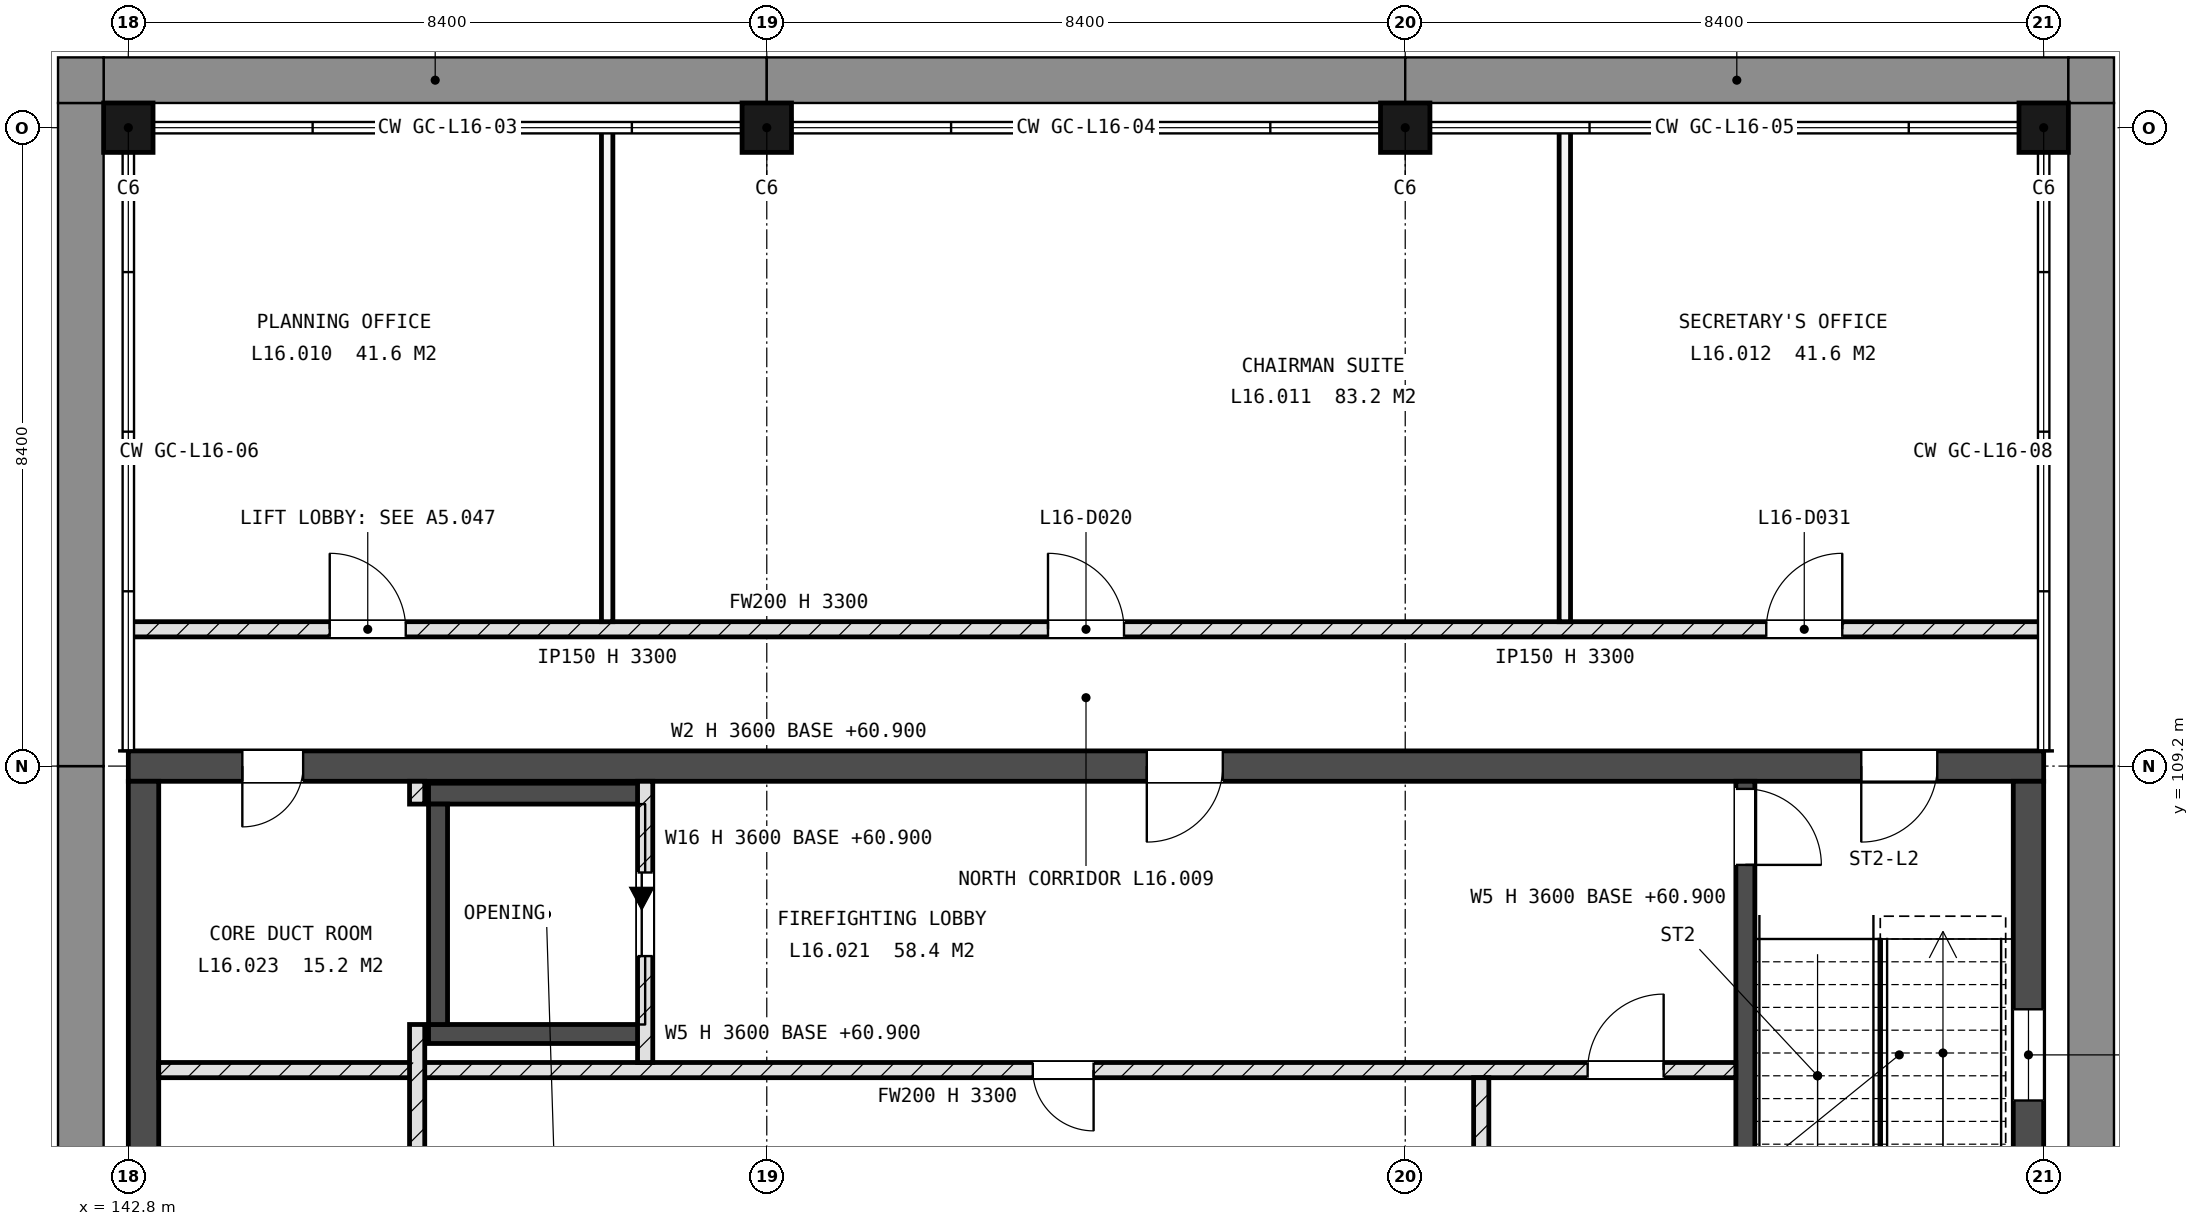
"""IFC4 building model, lengths in metres.
Left out: names, types, materials, properties, quantities, classifications, styles, units other than length and angle.
Written with IfcOpenShell. Run it as: python <this file> out.ifc"""

import sys

from ifc_helpers import new_model, si_unit, direction, frame, frame_2d, origin, origin_2d, place, context, subcontext, project, spatial, rectangle, extrude, element, fill, save


model = new_model("IFC4")
c1 = context("Model", 3, precision=1e-05, world=origin(), true_north=direction((0.0, 1.0)))
c2 = subcontext(c1, "Body", "Model", "MODEL_VIEW")
j1 = project(units=[si_unit("LENGTHUNIT", "METRE"), si_unit("PLANEANGLEUNIT", "RADIAN")], contexts=[c1])
p1 = place(None, origin())
s1 = spatial("IfcSite", under=j1, at=p1, CompositionType="ELEMENT")
p2 = place(p1, origin())
s2 = spatial("IfcBuilding", under=s1, at=p2, CompositionType="ELEMENT")
p3 = place(p2, frame((0.0, 0.0, 61.2)))
s3 = spatial("IfcBuildingStorey", under=s2, at=p3, CompositionType="ELEMENT", Elevation=61.2)
for number, where, z_axis, x_axis in (
    (1, (142.8, 117.6, -0.3), (0.0, 0.0, 1.0), (1.0, 0.0, 0.0)),
    (2, (151.2, 117.6, -0.3), (0.0, 0.0, 1.0), (1.0, 0.0, 0.0)),
    (3, (159.6, 117.6, -0.3), (0.0, 0.0, 1.0), (1.0, 0.0, 0.0)),
    (4, (168.0, 117.6, -0.3), (0.0, 0.0, 1.0), (1.0, 0.0, 0.0)),
):
    element("IfcColumn", number, at=place(p3, frame(where, z_axis=z_axis, x_axis=x_axis)), inside=s3, PredefinedType="COLUMN", context=c2, shape_type="SweptSolid", body=[
        extrude(rectangle(XDim=0.65, YDim=0.65, at=origin_2d()), origin(), (0.0, 0.0, 1.0), 3.6),
    ])
p4 = place(p3, frame((142.8, 109.2, -0.3), z_axis=(0.0, 0.0, 1.0), x_axis=(1.0, 0.0, 0.0)))
e5 = element("IfcWall", 5, at=p4, inside=s3, PredefinedType="SHEAR", context=c2, shape_type="SweptSolid", body=[
    extrude(rectangle(XDim=25.2, YDim=0.4, at=frame_2d((12.6, 0.0))), origin(), (0.0, 0.0, 1.0), 3.6),
])
p5 = place(p4, frame((22.8, 0.0, 0.3)))
e6 = element("IfcOpeningElement", 6, at=p5, cuts=e5, PredefinedType="OPENING", context=c2, shape_type="SweptSolid", body=[
    extrude(rectangle(XDim=1.0, YDim=2.1, at=frame_2d((0.5, 1.05))), frame((0.0, 0.21, 0.0), z_axis=(0.0, -1.0, 0.0), x_axis=(1.0, 0.0, 0.0)), (0.0, 0.0, 1.0), 0.42),
])
p6 = place(p4, frame((1.5, 0.0, 0.3)))
e7 = element("IfcOpeningElement", 7, at=p6, cuts=e5, PredefinedType="OPENING", context=c2, shape_type="SweptSolid", body=[
    extrude(rectangle(XDim=0.8, YDim=2.1, at=frame_2d((0.4, 1.05))), frame((0.0, 0.21, 0.0), z_axis=(0.0, -1.0, 0.0), x_axis=(1.0, 0.0, 0.0)), (0.0, 0.0, 1.0), 0.42),
])
p7 = place(p4, frame((13.4, 0.0, 0.3)))
e8 = element("IfcOpeningElement", 8, at=p7, cuts=e5, PredefinedType="OPENING", context=c2, shape_type="SweptSolid", body=[
    extrude(rectangle(XDim=1.0, YDim=2.1, at=frame_2d((0.5, 1.05))), frame((0.0, 0.21, 0.0), z_axis=(0.0, -1.0, 0.0), x_axis=(1.0, 0.0, 0.0)), (0.0, 0.0, 1.0), 0.42),
])
p8 = place(p3, frame((143.0, 92.6, -0.3), z_axis=(0.0, 0.0, 1.0), x_axis=(0.0, 1.0, 0.0)))
e9 = element("IfcWall", 9, at=p8, inside=s3, PredefinedType="SHEAR", context=c2, shape_type="SweptSolid", body=[
    extrude(rectangle(XDim=16.4, YDim=0.4, at=frame_2d((8.2, 0.0))), origin(), (0.0, 0.0, 1.0), 3.6),
])
p9 = place(p8, frame((3.0, 0.0, 1.9)))
e10 = element("IfcOpeningElement", 10, at=p9, cuts=e9, PredefinedType="OPENING", context=c2, shape_type="SweptSolid", body=[
    extrude(rectangle(XDim=1.2, YDim=0.9, at=frame_2d((0.6, 0.45))), frame((0.0, 0.21, 0.0), z_axis=(0.0, -1.0, 0.0), x_axis=(1.0, 0.0, 0.0)), (0.0, 0.0, 1.0), 0.42),
])
p10 = place(p3, frame((167.8, 92.6, -0.3), z_axis=(0.0, 0.0, 1.0), x_axis=(0.0, 1.0, 0.0)))
e11 = element("IfcWall", 11, at=p10, inside=s3, PredefinedType="SHEAR", context=c2, shape_type="SweptSolid", body=[
    extrude(rectangle(XDim=16.4, YDim=0.4, at=frame_2d((8.2, 0.0))), origin(), (0.0, 0.0, 1.0), 3.6),
])
p11 = place(p10, frame((12.2, 0.0, 1.9)))
e12 = element("IfcOpeningElement", 12, at=p11, cuts=e11, PredefinedType="OPENING", context=c2, shape_type="SweptSolid", body=[
    extrude(rectangle(XDim=1.2, YDim=0.9, at=frame_2d((0.6, 0.45))), frame((0.0, 0.21, 0.0), z_axis=(0.0, -1.0, 0.0), x_axis=(1.0, 0.0, 0.0)), (0.0, 0.0, 1.0), 0.42),
])
p12 = place(p3, frame((164.075, 101.35, -0.3), z_axis=(0.0, 0.0, 1.0), x_axis=(0.0, 1.0, 0.0)))
e13 = element("IfcWall", 13, at=p12, inside=s3, PredefinedType="SHEAR", context=c2, shape_type="SweptSolid", body=[
    extrude(rectangle(XDim=7.65, YDim=0.25, at=frame_2d((3.825, 0.0))), origin(), (0.0, 0.0, 1.0), 3.6),
])
p13 = place(p12, frame((6.55, 0.0, 0.3)))
e14 = element("IfcOpeningElement", 14, at=p13, cuts=e13, PredefinedType="OPENING", context=c2, shape_type="SweptSolid", body=[
    extrude(rectangle(XDim=1.0, YDim=2.1, at=frame_2d((0.5, 1.05))), frame((0.0, 0.135, 0.0), z_axis=(0.0, -1.0, 0.0), x_axis=(1.0, 0.0, 0.0)), (0.0, 0.0, 1.0), 0.27),
])
p14 = place(p3, frame((146.75, 105.675, -0.3), z_axis=(0.0, 0.0, 1.0), x_axis=(1.0, 0.0, 0.0)))
e15 = element("IfcWall", 15, at=p14, inside=s3, PredefinedType="SHEAR", context=c2, shape_type="SweptSolid", body=[
    extrude(rectangle(XDim=2.85, YDim=0.25, at=frame_2d((1.425, 0.0))), origin(), (0.0, 0.0, 1.0), 3.6),
])
p15 = place(p3, frame((146.75, 108.837, -0.3), z_axis=(0.0, 0.0, 1.0), x_axis=(1.0, 0.0, 0.0)))
e16 = element("IfcWall", 16, at=p15, inside=s3, PredefinedType="SHEAR", context=c2, shape_type="SweptSolid", body=[
    extrude(rectangle(XDim=2.85, YDim=0.275, at=frame_2d((1.425, 0.0))), origin(), (0.0, 0.0, 1.0), 3.6),
])
p16 = place(p3, frame((146.875, 105.8, -0.3), z_axis=(0.0, 0.0, 1.0), x_axis=(0.0, 1.0, 0.0)))
e17 = element("IfcWall", 17, at=p16, inside=s3, PredefinedType="SHEAR", context=c2, shape_type="SweptSolid", body=[
    extrude(rectangle(XDim=2.9, YDim=0.25, at=frame_2d((1.45, 0.0))), origin(), (0.0, 0.0, 1.0), 3.6),
])
p17 = place(p3, frame((143.2, 105.2, 0.0), z_axis=(0.0, 0.0, 1.0), x_axis=(1.0, 0.0, 0.0)))
e18 = element("IfcWall", 18, at=p17, inside=s3, PredefinedType="SOLIDWALL", context=c2, shape_type="SweptSolid", body=[
    extrude(rectangle(XDim=20.75, YDim=0.2, at=frame_2d((10.375, 0.0))), origin(), (0.0, 0.0, 1.0), 3.3),
])
p18 = place(p17, frame((11.5, 0.0, 0.0)))
e19 = element("IfcOpeningElement", 19, at=p18, cuts=e18, PredefinedType="OPENING", context=c2, shape_type="SweptSolid", body=[
    extrude(rectangle(XDim=0.8, YDim=2.1, at=frame_2d((0.4, 1.05))), frame((0.0, 0.11, 0.0), z_axis=(0.0, -1.0, 0.0), x_axis=(1.0, 0.0, 0.0)), (0.0, 0.0, 1.0), 0.22),
])
p19 = place(p17, frame((18.8, 0.0, 0.0)))
e20 = element("IfcOpeningElement", 20, at=p19, cuts=e18, PredefinedType="OPENING", context=c2, shape_type="SweptSolid", body=[
    extrude(rectangle(XDim=1.0, YDim=2.1, at=frame_2d((0.5, 1.05))), frame((0.0, 0.11, 0.0), z_axis=(0.0, -1.0, 0.0), x_axis=(1.0, 0.0, 0.0)), (0.0, 0.0, 1.0), 0.22),
])
p20 = place(p3, frame((142.8, 111.0, 0.0), z_axis=(0.0, 0.0, 1.0), x_axis=(1.0, 0.0, 0.0)))
e21 = element("IfcWall", 21, at=p20, inside=s3, PredefinedType="SOLIDWALL", context=c2, shape_type="SweptSolid", body=[
    extrude(rectangle(XDim=25.2, YDim=0.2, at=frame_2d((12.6, 0.0))), origin(), (0.0, 0.0, 1.0), 3.3),
])
p21 = place(p20, frame((2.65, 0.0, 0.0)))
e22 = element("IfcOpeningElement", 22, at=p21, cuts=e21, PredefinedType="OPENING", context=c2, shape_type="SweptSolid", body=[
    extrude(rectangle(XDim=1.0, YDim=2.1, at=frame_2d((0.5, 1.05))), frame((0.0, 0.11, 0.0), z_axis=(0.0, -1.0, 0.0), x_axis=(1.0, 0.0, 0.0)), (0.0, 0.0, 1.0), 0.22),
])
p22 = place(p20, frame((12.1, 0.0, 0.0)))
e23 = element("IfcOpeningElement", 23, at=p22, cuts=e21, PredefinedType="OPENING", context=c2, shape_type="SweptSolid", body=[
    extrude(rectangle(XDim=1.0, YDim=2.1, at=frame_2d((0.5, 1.05))), frame((0.0, 0.11, 0.0), z_axis=(0.0, -1.0, 0.0), x_axis=(1.0, 0.0, 0.0)), (0.0, 0.0, 1.0), 0.22),
])
p23 = place(p20, frame((21.55, 0.0, 0.0)))
e24 = element("IfcOpeningElement", 24, at=p23, cuts=e21, PredefinedType="OPENING", context=c2, shape_type="SweptSolid", body=[
    extrude(rectangle(XDim=1.0, YDim=2.1, at=frame_2d((0.5, 1.05))), frame((0.0, 0.11, 0.0), z_axis=(0.0, -1.0, 0.0), x_axis=(1.0, 0.0, 0.0)), (0.0, 0.0, 1.0), 0.22),
])
p24 = place(p3, frame((146.6, 100.5, 0.0), z_axis=(0.0, 0.0, 1.0), x_axis=(0.0, 1.0, 0.0)))
e25 = element("IfcWall", 25, at=p24, inside=s3, PredefinedType="SOLIDWALL", context=c2, shape_type="SweptSolid", body=[
    extrude(rectangle(XDim=5.3, YDim=0.2, at=frame_2d((2.65, 0.0))), origin(), (0.0, 0.0, 1.0), 3.3),
])
p25 = place(p24, frame((1.8, 0.0, 0.0)))
e26 = element("IfcOpeningElement", 26, at=p25, cuts=e25, PredefinedType="OPENING", context=c2, shape_type="SweptSolid", body=[
    extrude(rectangle(XDim=1.0, YDim=2.1, at=frame_2d((0.5, 1.05))), frame((0.0, 0.11, 0.0), z_axis=(0.0, -1.0, 0.0), x_axis=(1.0, 0.0, 0.0)), (0.0, 0.0, 1.0), 0.22),
])
p26 = place(p3, frame((146.6, 108.7, 0.0), z_axis=(0.0, 0.0, 1.0), x_axis=(0.0, 1.0, 0.0)))
e27 = element("IfcWall", 27, at=p26, inside=s3, PredefinedType="SOLIDWALL", context=c2, shape_type="SweptSolid", body=[
    extrude(rectangle(XDim=0.3, YDim=0.2, at=frame_2d((0.15, 0.0))), origin(), (0.0, 0.0, 1.0), 3.3),
])
p27 = place(p3, frame((149.1, 111.1, 0.0), z_axis=(0.0, 0.0, 1.0), x_axis=(0.0, 1.0, 0.0)))
e28 = element("IfcWall", 28, at=p27, inside=s3, PredefinedType="PARTITIONING", context=c2, shape_type="SweptSolid", body=[
    extrude(rectangle(XDim=6.5, YDim=0.15, at=frame_2d((3.25, 0.0))), origin(), (0.0, 0.0, 1.0), 3.3),
])
p28 = place(p3, frame((149.6, 105.3, 0.0), z_axis=(0.0, 0.0, 1.0), x_axis=(0.0, 1.0, 0.0)))
e29 = element("IfcWall", 29, at=p28, inside=s3, PredefinedType="SOLIDWALL", context=c2, shape_type="SweptSolid", body=[
    extrude(rectangle(XDim=3.7, YDim=0.2, at=frame_2d((1.85, 0.0))), origin(), (0.0, 0.0, 1.0), 3.3),
])
p29 = place(p28, frame((1.4, 0.0, 0.0)))
e30 = element("IfcOpeningElement", 30, at=p29, cuts=e29, PredefinedType="OPENING", context=c2, shape_type="SweptSolid", body=[
    extrude(rectangle(XDim=1.1, YDim=2.1, at=frame_2d((0.55, 1.05))), frame((0.0, 0.11, 0.0), z_axis=(0.0, -1.0, 0.0), x_axis=(1.0, 0.0, 0.0)), (0.0, 0.0, 1.0), 0.22),
])
p30 = place(p3, frame((160.6, 92.6, 0.0), z_axis=(0.0, 0.0, 1.0), x_axis=(0.0, 1.0, 0.0)))
e31 = element("IfcWall", 31, at=p30, inside=s3, PredefinedType="SOLIDWALL", context=c2, shape_type="SweptSolid", body=[
    extrude(rectangle(XDim=12.5, YDim=0.2, at=frame_2d((6.25, 0.0))), origin(), (0.0, 0.0, 1.0), 3.3),
])
p31 = place(p30, frame((5.1, 0.0, 0.0)))
e32 = element("IfcOpeningElement", 32, at=p31, cuts=e31, PredefinedType="OPENING", context=c2, shape_type="SweptSolid", body=[
    extrude(rectangle(XDim=0.8, YDim=2.1, at=frame_2d((0.4, 1.05))), frame((0.0, 0.11, 0.0), z_axis=(0.0, -1.0, 0.0), x_axis=(1.0, 0.0, 0.0)), (0.0, 0.0, 1.0), 0.22),
])
p32 = place(p30, frame((0.8, 0.0, 0.0)))
e33 = element("IfcOpeningElement", 33, at=p32, cuts=e31, PredefinedType="OPENING", context=c2, shape_type="SweptSolid", body=[
    extrude(rectangle(XDim=1.0, YDim=2.1, at=frame_2d((0.5, 1.05))), frame((0.0, 0.11, 0.0), z_axis=(0.0, -1.0, 0.0), x_axis=(1.0, 0.0, 0.0)), (0.0, 0.0, 1.0), 0.22),
])
p33 = place(p3, frame((161.7, 111.1, 0.0), z_axis=(0.0, 0.0, 1.0), x_axis=(0.0, 1.0, 0.0)))
e34 = element("IfcWall", 34, at=p33, inside=s3, PredefinedType="PARTITIONING", context=c2, shape_type="SweptSolid", body=[
    extrude(rectangle(XDim=6.5, YDim=0.15, at=frame_2d((3.25, 0.0))), origin(), (0.0, 0.0, 1.0), 3.3),
])
p34 = place(p11, origin())
e35 = element("IfcWindow", 35, at=p34, inside=s3, PartitioningType="SINGLE_PANEL", PredefinedType="WINDOW", context=c2, shape_type="SweptSolid", body=[
    extrude(rectangle(XDim=1.2, YDim=0.9, at=frame_2d((0.6, 0.45))), frame((0.0, 0.03, 0.0), z_axis=(0.0, -1.0, 0.0), x_axis=(1.0, 0.0, 0.0)), (0.0, 0.0, 1.0), 0.06),
])
fill(e12, e35)
p35 = place(p29, origin())
e36 = element("IfcDoor", 36, at=p35, inside=s3, OperationType="SLIDING_TO_LEFT", PredefinedType="DOOR", context=c2, shape_type="SweptSolid", body=[
    extrude(rectangle(XDim=1.1, YDim=2.1, at=frame_2d((0.55, 1.05))), frame((0.0, 0.025, 0.0), z_axis=(0.0, -1.0, 0.0), x_axis=(1.0, 0.0, 0.0)), (0.0, 0.0, 1.0), 0.05),
])
fill(e30, e36)
p36 = place(p13, origin())
e37 = element("IfcDoor", 37, at=p36, inside=s3, OperationType="SINGLE_SWING_LEFT", PredefinedType="DOOR", context=c2, shape_type="SweptSolid", body=[
    extrude(rectangle(XDim=1.0, YDim=2.1, at=frame_2d((0.5, 1.05))), frame((0.0, 0.025, 0.0), z_axis=(0.0, -1.0, 0.0), x_axis=(1.0, 0.0, 0.0)), (0.0, 0.0, 1.0), 0.05),
])
fill(e14, e37)
p37 = place(p5, origin())
e38 = element("IfcDoor", 38, at=p37, inside=s3, OperationType="SINGLE_SWING_LEFT", PredefinedType="DOOR", context=c2, shape_type="SweptSolid", body=[
    extrude(rectangle(XDim=1.0, YDim=2.1, at=frame_2d((0.5, 1.05))), frame((0.0, 0.025, 0.0), z_axis=(0.0, -1.0, 0.0), x_axis=(1.0, 0.0, 0.0)), (0.0, 0.0, 1.0), 0.05),
])
fill(e6, e38)
p38 = place(p21, origin())
e39 = element("IfcDoor", 39, at=p38, inside=s3, OperationType="SINGLE_SWING_RIGHT", PredefinedType="DOOR", context=c2, shape_type="SweptSolid", body=[
    extrude(rectangle(XDim=1.0, YDim=2.1, at=frame_2d((0.5, 1.05))), frame((0.0, 0.025, 0.0), z_axis=(0.0, -1.0, 0.0), x_axis=(1.0, 0.0, 0.0)), (0.0, 0.0, 1.0), 0.05),
])
fill(e22, e39)
p39 = place(p22, origin())
e40 = element("IfcDoor", 40, at=p39, inside=s3, OperationType="SINGLE_SWING_RIGHT", PredefinedType="DOOR", context=c2, shape_type="SweptSolid", body=[
    extrude(rectangle(XDim=1.0, YDim=2.1, at=frame_2d((0.5, 1.05))), frame((0.0, 0.025, 0.0), z_axis=(0.0, -1.0, 0.0), x_axis=(1.0, 0.0, 0.0)), (0.0, 0.0, 1.0), 0.05),
])
fill(e23, e40)
p40 = place(p23, origin())
e41 = element("IfcDoor", 41, at=p40, inside=s3, OperationType="SINGLE_SWING_LEFT", PredefinedType="DOOR", context=c2, shape_type="SweptSolid", body=[
    extrude(rectangle(XDim=1.0, YDim=2.1, at=frame_2d((0.5, 1.05))), frame((0.0, 0.025, 0.0), z_axis=(0.0, -1.0, 0.0), x_axis=(1.0, 0.0, 0.0)), (0.0, 0.0, 1.0), 0.05),
])
fill(e24, e41)
p41 = place(p18, origin())
e42 = element("IfcDoor", 42, at=p41, inside=s3, OperationType="SINGLE_SWING_RIGHT", PredefinedType="DOOR", context=c2, shape_type="SweptSolid", body=[
    extrude(rectangle(XDim=0.8, YDim=2.1, at=frame_2d((0.4, 1.05))), frame((0.0, 0.025, 0.0), z_axis=(0.0, -1.0, 0.0), x_axis=(1.0, 0.0, 0.0)), (0.0, 0.0, 1.0), 0.05),
])
fill(e19, e42)
p42 = place(p6, origin())
e43 = element("IfcDoor", 43, at=p42, inside=s3, OperationType="SINGLE_SWING_LEFT", PredefinedType="DOOR", context=c2, shape_type="SweptSolid", body=[
    extrude(rectangle(XDim=0.8, YDim=2.1, at=frame_2d((0.4, 1.05))), frame((0.0, 0.025, 0.0), z_axis=(0.0, -1.0, 0.0), x_axis=(1.0, 0.0, 0.0)), (0.0, 0.0, 1.0), 0.05),
])
fill(e7, e43)
p43 = place(p7, origin())
e44 = element("IfcDoor", 44, at=p43, inside=s3, OperationType="SINGLE_SWING_LEFT", PredefinedType="DOOR", context=c2, shape_type="SweptSolid", body=[
    extrude(rectangle(XDim=1.0, YDim=2.1, at=frame_2d((0.5, 1.05))), frame((0.0, 0.025, 0.0), z_axis=(0.0, -1.0, 0.0), x_axis=(1.0, 0.0, 0.0)), (0.0, 0.0, 1.0), 0.05),
])
fill(e8, e44)
p44 = place(p19, origin())
e45 = element("IfcDoor", 45, at=p44, inside=s3, OperationType="SINGLE_SWING_LEFT", PredefinedType="DOOR", context=c2, shape_type="SweptSolid", body=[
    extrude(rectangle(XDim=1.0, YDim=2.1, at=frame_2d((0.5, 1.05))), frame((0.0, 0.025, 0.0), z_axis=(0.0, -1.0, 0.0), x_axis=(1.0, 0.0, 0.0)), (0.0, 0.0, 1.0), 0.05),
])
fill(e20, e45)
save(model, sys.argv[1])
